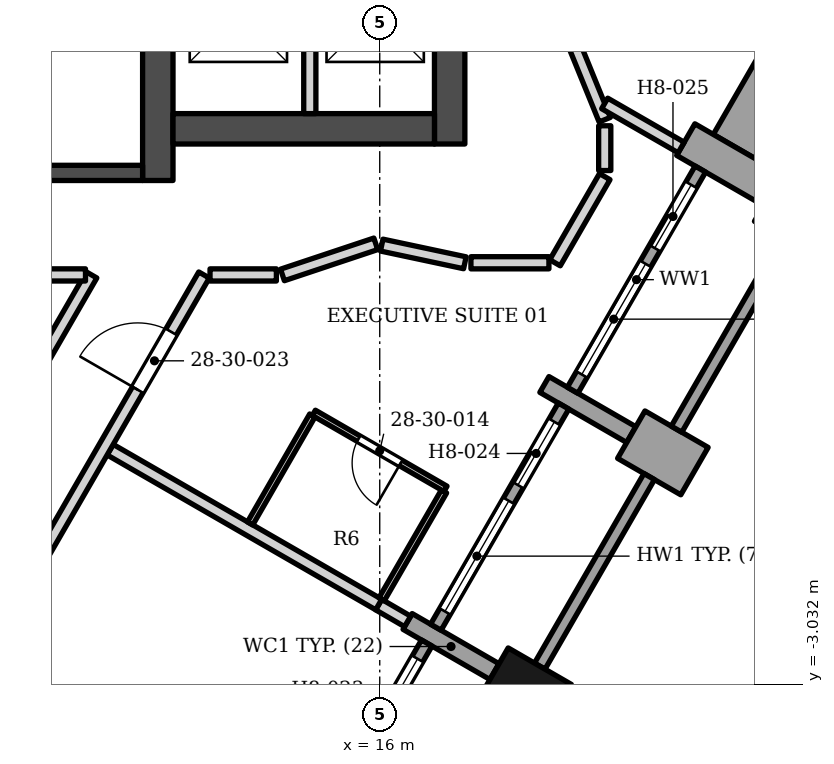
"""IFC4 building model, lengths in metres.
Left out: names, types, materials, properties, quantities, classifications, styles, units other than length and angle.
Written with IfcOpenShell. Run it as: python <this file> out.ifc"""

import sys

from ifc_helpers import new_model, si_unit, direction, frame, frame_2d, origin, origin_2d, place, context, subcontext, project, spatial, polyline, rectangle, outline, extrude, element, fill, save


model = new_model("IFC4")
c1 = context("Model", 3, precision=1e-05, world=origin(), true_north=direction((0.0, 1.0)))
c2 = subcontext(c1, "Body", "Model", "MODEL_VIEW")
j1 = project(units=[si_unit("LENGTHUNIT", "METRE"), si_unit("PLANEANGLEUNIT", "RADIAN")], contexts=[c1])
p1 = place(None, origin())
s1 = spatial("IfcSite", under=j1, at=p1, CompositionType="ELEMENT")
p2 = place(p1, origin())
s2 = spatial("IfcBuilding", under=s1, at=p2, CompositionType="ELEMENT")
p3 = place(p2, frame((0.0, 0.0, 122.4)))
s3 = spatial("IfcBuildingStorey", under=s2, at=p3, CompositionType="ELEMENT", Elevation=122.4)
p4 = place(p3, frame((12.35, 5.253, 0.0), z_axis=(0.0, 0.0, 1.0), x_axis=(0.0, 1.0, 0.0)))
e1 = element("IfcWall", 1, at=p4, inside=s3, PredefinedType="SHEAR", context=c2, shape_type="SweptSolid", body=[
    extrude(rectangle(XDim=13.3, YDim=0.5, at=frame_2d((6.65, 0.0))), origin(), (0.0, 0.0, 1.0), 3.4),
])
p5 = place(p3, frame((8.35, 5.378, 0.0), z_axis=(0.0, 0.0, 1.0), x_axis=(1.0, 0.0, 0.0)))
e2 = element("IfcWall", 2, at=p5, inside=s3, PredefinedType="SHEAR", context=c2, shape_type="SweptSolid", body=[
    extrude(rectangle(XDim=3.75, YDim=0.25, at=frame_2d((1.875, 0.0))), origin(), (0.0, 0.0, 1.0), 3.4),
])
p6 = place(p3, frame((12.6, 6.103, 0.0), z_axis=(0.0, 0.0, 1.0), x_axis=(1.0, 0.0, 0.0)))
e3 = element("IfcWall", 3, at=p6, inside=s3, PredefinedType="SHEAR", context=c2, shape_type="SweptSolid", body=[
    extrude(rectangle(XDim=4.3, YDim=0.5, at=frame_2d((2.15, 0.0))), origin(), (0.0, 0.0, 1.0), 3.4),
])
p7 = place(p3, frame((17.15, 5.853, 0.0), z_axis=(0.0, 0.0, 1.0), x_axis=(0.0, 1.0, 0.0)))
e4 = element("IfcWall", 4, at=p7, inside=s3, PredefinedType="SHEAR", context=c2, shape_type="SweptSolid", body=[
    extrude(rectangle(XDim=13.2, YDim=0.5, at=frame_2d((6.6, 0.0))), origin(), (0.0, 0.0, 1.0), 3.4),
])
p8 = place(p7, frame((4.1, 0.0, 0.0)))
e5 = element("IfcOpeningElement", 5, at=p8, cuts=e4, PredefinedType="OPENING", context=c2, shape_type="SweptSolid", body=[
    extrude(rectangle(XDim=1.6, YDim=2.1, at=frame_2d((0.8, 1.05))), frame((0.0, 0.26, 0.0), z_axis=(0.0, -1.0, 0.0), x_axis=(1.0, 0.0, 0.0)), (0.0, 0.0, 1.0), 0.52),
])
p9 = place(p7, frame((10.15, 0.0, 0.0)))
e6 = element("IfcOpeningElement", 6, at=p9, cuts=e4, PredefinedType="OPENING", context=c2, shape_type="SweptSolid", body=[
    extrude(rectangle(XDim=0.9, YDim=2.1, at=frame_2d((0.45, 1.05))), frame((0.0, 0.26, 0.0), z_axis=(0.0, -1.0, 0.0), x_axis=(1.0, 0.0, 0.0)), (0.0, 0.0, 1.0), 0.52),
])
for number, where, z_axis, x_axis in (
    (7, (18.407, -3.124, 0.0), (0.0, 0.0, 1.0), (0.5, 0.866, 0.0)),
    (8, (22.907, 4.671, 0.0), (0.0, 0.0, 1.0), (0.5, 0.866, 0.0)),
):
    element("IfcColumn", number, at=place(p3, frame(where, z_axis=z_axis, x_axis=x_axis)), inside=s3, PredefinedType="COLUMN", context=c2, shape_type="SweptSolid", body=[
        extrude(rectangle(XDim=0.9, YDim=1.2, at=origin_2d()), origin(), (0.0, 0.0, 1.0), 3.4),
    ])
p10 = place(p3, frame((16.458, -1.999, 0.0), z_axis=(0.0, 0.0, 1.0), x_axis=(0.866040211805, -0.499974350878, 0.0)))
e9 = element("IfcWall", 9, at=p10, inside=s3, PredefinedType="SOLIDWALL", context=c2, shape_type="SweptSolid", body=[
    extrude(rectangle(XDim=1.65, YDim=0.3, at=frame_2d((0.825, 0.0))), origin(), (0.0, 0.0, 1.0), 2.65),
])
p11 = place(p3, frame((21.176, 0.473, 0.0), z_axis=(0.0, 0.0, 1.0), x_axis=(-0.866006032174, 0.500033551112, 0.0)))
e10 = element("IfcWall", 10, at=p11, inside=s3, PredefinedType="SOLIDWALL", context=c2, shape_type="SweptSolid", body=[
    extrude(rectangle(XDim=1.2, YDim=0.9, at=frame_2d((0.6, 0.0))), origin(), (0.0, 0.0, 1.0), 2.63),
])
p12 = place(p3, frame((18.708, 1.898, 0.0), z_axis=(0.0, 0.0, 1.0), x_axis=(0.866040211805, -0.499974350878, 0.0)))
e11 = element("IfcWall", 11, at=p12, inside=s3, PredefinedType="SOLIDWALL", context=c2, shape_type="SweptSolid", body=[
    extrude(rectangle(XDim=1.65, YDim=0.3, at=frame_2d((0.825, 0.0))), origin(), (0.0, 0.0, 1.0), 2.65),
])
p13 = place(p3, frame((21.033, 5.925, 0.0), z_axis=(0.0, 0.0, 1.0), x_axis=(0.866040211805, -0.499974350878, 0.0)))
e12 = element("IfcWall", 12, at=p13, inside=s3, PredefinedType="SOLIDWALL", context=c2, shape_type="SweptSolid", body=[
    extrude(rectangle(XDim=1.65, YDim=0.6, at=frame_2d((0.825, 0.0))), origin(), (0.0, 0.0, 1.0), 2.384),
])
p14 = place(p3, frame((14.673, -5.991, 0.0), z_axis=(0.0, 0.0, 1.0), x_axis=(0.499958946799, 0.866049104564, 0.0)))
e13 = element("IfcWall", 13, at=p14, inside=s3, PredefinedType="ELEMENTEDWALL", context=c2, shape_type="SweptSolid", body=[
    extrude(rectangle(XDim=4.2, YDim=0.2, at=frame_2d((2.1, 0.0))), origin(), (0.0, 0.0, 1.0), 2.474),
])
p15 = place(p14, frame((0.3, 0.0, 0.6)))
e14 = element("IfcOpeningElement", 14, at=p15, cuts=e13, PredefinedType="OPENING", context=c2, shape_type="SweptSolid", body=[
    extrude(rectangle(XDim=2.1, YDim=1.77, at=frame_2d((1.05, 0.885))), frame((0.0, 0.11, 0.0), z_axis=(0.0, -1.0, 0.0), x_axis=(1.0, 0.0, 0.0)), (0.0, 0.0, 1.0), 0.22),
])
p16 = place(p14, frame((2.7, 0.0, 0.0)))
e15 = element("IfcOpeningElement", 15, at=p16, cuts=e13, PredefinedType="OPENING", context=c2, shape_type="SweptSolid", body=[
    extrude(rectangle(XDim=1.2, YDim=2.37, at=frame_2d((0.6, 1.185))), frame((0.0, 0.11, 0.0), z_axis=(0.0, -1.0, 0.0), x_axis=(1.0, 0.0, 0.0)), (0.0, 0.0, 1.0), 0.22),
])
p17 = place(p3, frame((18.632, -2.734, 0.0), z_axis=(0.0, 0.0, 1.0), x_axis=(0.499982693035, 0.866035395735, 0.0)))
e16 = element("IfcWall", 16, at=p17, inside=s3, PredefinedType="SOLIDWALL", context=c2, shape_type="SweptSolid", body=[
    extrude(rectangle(XDim=3.6, YDim=0.2, at=frame_2d((1.8, 0.0))), origin(), (0.0, 0.0, 1.0), 2.63),
])
p18 = place(p3, frame((16.923, -2.094, 0.0), z_axis=(0.0, 0.0, 1.0), x_axis=(0.49998411664, 0.866034573852, 0.0)))
e17 = element("IfcWall", 17, at=p18, inside=s3, PredefinedType="ELEMENTEDWALL", context=c2, shape_type="SweptSolid", body=[
    extrude(rectangle(XDim=4.2, YDim=0.2, at=frame_2d((2.1, 0.0))), origin(), (0.0, 0.0, 1.0), 2.65),
])
p19 = place(p18, frame((0.3, 0.0, 0.6)))
e18 = element("IfcOpeningElement", 18, at=p19, cuts=e17, PredefinedType="OPENING", context=c2, shape_type="SweptSolid", body=[
    extrude(rectangle(XDim=2.1, YDim=1.8, at=frame_2d((1.05, 0.9))), frame((0.0, 0.11, 0.0), z_axis=(0.0, -1.0, 0.0), x_axis=(1.0, 0.0, 0.0)), (0.0, 0.0, 1.0), 0.22),
])
p20 = place(p18, frame((2.7, 0.0, 0.0)))
e19 = element("IfcOpeningElement", 19, at=p20, cuts=e17, PredefinedType="OPENING", context=c2, shape_type="SweptSolid", body=[
    extrude(rectangle(XDim=1.2, YDim=2.4, at=frame_2d((0.6, 1.2))), frame((0.0, 0.11, 0.0), z_axis=(0.0, -1.0, 0.0), x_axis=(1.0, 0.0, 0.0)), (0.0, 0.0, 1.0), 0.22),
])
p21 = place(p3, frame((20.882, 1.163, 0.0), z_axis=(0.0, 0.0, 1.0), x_axis=(0.500012057535, 0.866018442252, 0.0)))
e20 = element("IfcWall", 20, at=p21, inside=s3, PredefinedType="SOLIDWALL", context=c2, shape_type="SweptSolid", body=[
    extrude(rectangle(XDim=3.6, YDim=0.2, at=frame_2d((1.8, 0.0))), origin(), (0.0, 0.0, 1.0), 2.63),
])
p22 = place(p3, frame((19.173, 1.803, 0.0), z_axis=(0.0, 0.0, 1.0), x_axis=(0.499958946799, 0.866049104564, 0.0)))
e21 = element("IfcWall", 21, at=p22, inside=s3, PredefinedType="ELEMENTEDWALL", context=c2, shape_type="SweptSolid", body=[
    extrude(rectangle(XDim=4.2, YDim=0.2, at=frame_2d((2.1, 0.0))), origin(), (0.0, 0.0, 1.0), 2.45),
])
p23 = place(p22, frame((0.3, 0.0, 0.6)))
e22 = element("IfcOpeningElement", 22, at=p23, cuts=e21, PredefinedType="OPENING", context=c2, shape_type="SweptSolid", body=[
    extrude(rectangle(XDim=2.1, YDim=1.75, at=frame_2d((1.05, 0.875))), frame((0.0, 0.11, 0.0), z_axis=(0.0, -1.0, 0.0), x_axis=(1.0, 0.0, 0.0)), (0.0, 0.0, 1.0), 0.22),
])
p24 = place(p22, frame((2.7, 0.0, 0.0)))
e23 = element("IfcOpeningElement", 23, at=p24, cuts=e21, PredefinedType="OPENING", context=c2, shape_type="SweptSolid", body=[
    extrude(rectangle(XDim=1.2, YDim=2.35, at=frame_2d((0.6, 1.175))), frame((0.0, 0.11, 0.0), z_axis=(0.0, -1.0, 0.0), x_axis=(1.0, 0.0, 0.0)), (0.0, 0.0, 1.0), 0.22),
])
p25 = place(p3, origin())
e24 = element("IfcWall", 24, at=p25, inside=s3, PredefinedType="SOLIDWALL", context=c2, shape_type="SweptSolid", body=[
    extrude(outline(polyline([(22.565, 7.878), (21.486, 6.01), (22.612, 5.36), (22.612, 5.361), (23.652, 4.761), (24.73, 6.628), (22.565, 7.878)])), origin(), (0.0, 0.0, 1.0), 2.384),
])
p26 = place(p3, frame((14.85, 6.353, 0.0), z_axis=(0.0, 0.0, 1.0), x_axis=(0.0, 1.0, 0.0)))
e25 = element("IfcWall", 25, at=p26, inside=s3, PredefinedType="SOLIDWALL", context=c2, shape_type="SweptSolid", body=[
    extrude(rectangle(XDim=2.5, YDim=0.2, at=frame_2d((1.25, 0.0))), origin(), (0.0, 0.0, 1.0), 3.23),
])
p27 = place(p3, frame((5.829, -5.705, 0.0), z_axis=(0.0, 0.0, 1.0), x_axis=(0.500142759665, 0.865942965763, 0.0)))
e26 = element("IfcWall", 26, at=p27, inside=s3, PredefinedType="PARTITIONING", context=c2, shape_type="SweptSolid", body=[
    extrude(rectangle(XDim=10.86, YDim=0.2, at=frame_2d((5.43, 0.0))), origin(), (0.0, 0.0, 1.0), 2.242),
])
p28 = place(p27, frame((6.768, 0.0, 0.0)))
e27 = element("IfcOpeningElement", 27, at=p28, cuts=e26, PredefinedType="OPENING", context=c2, shape_type="SweptSolid", body=[
    extrude(rectangle(XDim=1.0, YDim=2.1, at=frame_2d((0.5, 1.05))), frame((0.0, 0.11, 0.0), z_axis=(0.0, -1.0, 0.0), x_axis=(1.0, 0.0, 0.0)), (0.0, 0.0, 1.0), 0.22),
])
p29 = place(p27, frame((3.563, 0.0, 0.0)))
e28 = element("IfcOpeningElement", 28, at=p29, cuts=e26, PredefinedType="OPENING", context=c2, shape_type="SweptSolid", body=[
    extrude(rectangle(XDim=1.0, YDim=2.1, at=frame_2d((0.5, 1.05))), frame((0.0, 0.11, 0.0), z_axis=(0.0, -1.0, 0.0), x_axis=(1.0, 0.0, 0.0)), (0.0, 0.0, 1.0), 0.22),
])
p30 = place(p3, frame((15.983, -1.722, 0.0), z_axis=(0.0, 0.0, 1.0), x_axis=(0.864695615284, -0.502296220281, 0.0)))
e29 = element("IfcWall", 29, at=p30, inside=s3, PredefinedType="PARTITIONING", context=c2, shape_type="SweptSolid", body=[
    extrude(rectangle(XDim=0.55, YDim=0.2, at=frame_2d((0.275, 0.0))), origin(), (0.0, 0.0, 1.0), 3.23),
])
p31 = place(p3, frame((11.566, 0.826, 0.0), z_axis=(0.0, 0.0, 1.0), x_axis=(0.866318662666, -0.499491716364, 0.0)))
e30 = element("IfcWall", 30, at=p31, inside=s3, PredefinedType="PARTITIONING", context=c2, shape_type="SweptSolid", body=[
    extrude(rectangle(XDim=5.099, YDim=0.2, at=frame_2d((2.55, 0.0))), origin(), (0.0, 0.0, 1.0), 2.308),
])
p32 = place(p3, frame((16.031, -1.636, 0.0), z_axis=(0.0, 0.0, 1.0), x_axis=(0.500646589026, 0.865651773461, 0.0)))
e31 = element("IfcWall", 31, at=p32, inside=s3, PredefinedType="PARTITIONING", context=c2, shape_type="SweptSolid", body=[
    extrude(rectangle(XDim=2.05, YDim=0.1, at=frame_2d((1.025, 0.0))), origin(), (0.0, 0.0, 1.0), 3.23),
])
p33 = place(p3, frame((14.917, 1.432, 0.0), z_axis=(0.0, 0.0, 1.0), x_axis=(0.866022959057, -0.500004234368, 0.0)))
e32 = element("IfcWall", 32, at=p33, inside=s3, PredefinedType="PARTITIONING", context=c2, shape_type="SweptSolid", body=[
    extrude(rectangle(XDim=2.5, YDim=0.1, at=frame_2d((1.25, 0.0))), origin(), (0.0, 0.0, 1.0), 2.474),
])
p34 = place(p33, frame((0.85, 0.0, 0.0)))
e33 = element("IfcOpeningElement", 33, at=p34, cuts=e32, PredefinedType="OPENING", context=c2, shape_type="SweptSolid", body=[
    extrude(rectangle(XDim=0.8, YDim=2.1, at=frame_2d((0.4, 1.05))), frame((0.0, 0.06, 0.0), z_axis=(0.0, -1.0, 0.0), x_axis=(1.0, 0.0, 0.0)), (0.0, 0.0, 1.0), 0.12),
])
p35 = place(p3, frame((13.868, -0.387, 0.0), z_axis=(0.0, 0.0, 1.0), x_axis=(0.499265284884, 0.866449176415, 0.0)))
e34 = element("IfcWall", 34, at=p35, inside=s3, PredefinedType="PARTITIONING", context=c2, shape_type="SweptSolid", body=[
    extrude(rectangle(XDim=2.05, YDim=0.1, at=frame_2d((1.025, 0.0))), origin(), (0.0, 0.0, 1.0), 3.23),
])
p36 = place(p3, frame((6.0, 3.7, 0.0), z_axis=(0.0, 0.0, 1.0), x_axis=(1.0, 0.0, 0.0)))
e35 = element("IfcWall", 35, at=p36, inside=s3, PredefinedType="PARTITIONING", context=c2, shape_type="SweptSolid", body=[
    extrude(rectangle(XDim=5.161, YDim=0.2, at=frame_2d((2.581, 0.0))), origin(), (0.0, 0.0, 1.0), 2.242),
])
p37 = place(p3, frame((0.23, -18.61, 0.0), z_axis=(0.0, 0.0, 1.0), x_axis=(0.499999197515, 0.866025867099, 0.0)))
e36 = element("IfcWall", 36, at=p37, inside=s3, PredefinedType="PARTITIONING", context=c2, shape_type="SweptSolid", body=[
    extrude(rectangle(XDim=25.76, YDim=0.2, at=frame_2d((12.88, 0.0))), origin(), (0.0, 0.0, 1.0), 2.242),
])
p38 = place(p37, frame((0.8, 0.0, 0.0)))
e37 = element("IfcOpeningElement", 37, at=p38, cuts=e36, PredefinedType="OPENING", context=c2, shape_type="SweptSolid", body=[
    extrude(rectangle(XDim=1.1, YDim=2.1, at=frame_2d((0.55, 1.05))), frame((0.0, 0.11, 0.0), z_axis=(0.0, -1.0, 0.0), x_axis=(1.0, 0.0, 0.0)), (0.0, 0.0, 1.0), 0.22),
])
p39 = place(p37, frame((14.95, 0.0, 0.0)))
e38 = element("IfcOpeningElement", 38, at=p39, cuts=e36, PredefinedType="OPENING", context=c2, shape_type="SweptSolid", body=[
    extrude(rectangle(XDim=1.6, YDim=2.1, at=frame_2d((0.8, 1.05))), frame((0.0, 0.11, 0.0), z_axis=(0.0, -1.0, 0.0), x_axis=(1.0, 0.0, 0.0)), (0.0, 0.0, 1.0), 0.22),
])
p40 = place(p37, frame((23.58, 0.0, 0.0)))
e39 = element("IfcOpeningElement", 39, at=p40, cuts=e36, PredefinedType="OPENING", context=c2, shape_type="SweptSolid", body=[
    extrude(rectangle(XDim=1.1, YDim=2.1, at=frame_2d((0.55, 1.05))), frame((0.0, 0.11, 0.0), z_axis=(0.0, -1.0, 0.0), x_axis=(1.0, 0.0, 0.0)), (0.0, 0.0, 1.0), 0.22),
])
p41 = place(p3, frame((13.209, 3.699, 0.0), z_axis=(0.0, 0.0, 1.0), x_axis=(1.0, 0.0, 0.0)))
e40 = element("IfcWall", 40, at=p41, inside=s3, PredefinedType="PARTITIONING", context=c2, shape_type="SweptSolid", body=[
    extrude(rectangle(XDim=1.091, YDim=0.2, at=frame_2d((0.545, 0.0))), origin(), (0.0, 0.0, 1.0), 2.308),
])
p42 = place(p3, frame((14.4, 3.699, 0.0), z_axis=(0.0, 0.0, 1.0), x_axis=(0.948653110684, 0.316318313712, 0.0)))
e41 = element("IfcWall", 41, at=p42, inside=s3, PredefinedType="PARTITIONING", context=c2, shape_type="SweptSolid", body=[
    extrude(rectangle(XDim=1.618, YDim=0.2, at=frame_2d((0.809, 0.0))), origin(), (0.0, 0.0, 1.0), 2.474),
])
p43 = place(p3, frame((17.5, 3.899, 0.0), z_axis=(0.0, 0.0, 1.0), x_axis=(0.99999998188, 0.000190367406, 0.0)))
e42 = element("IfcWall", 42, at=p43, inside=s3, PredefinedType="PARTITIONING", context=c2, shape_type="SweptSolid", body=[
    extrude(rectangle(XDim=1.282, YDim=0.2, at=frame_2d((0.641, 0.0))), origin(), (0.0, 0.0, 1.0), 3.23),
])
p44 = place(p3, frame((18.882, 3.9, 0.0), z_axis=(0.0, 0.0, 1.0), x_axis=(0.500071224646, 0.865984278311, 0.0)))
e43 = element("IfcWall", 43, at=p44, inside=s3, PredefinedType="PARTITIONING", context=c2, shape_type="SweptSolid", body=[
    extrude(rectangle(XDim=1.636, YDim=0.2, at=frame_2d((0.818, 0.0))), origin(), (0.0, 0.0, 1.0), 2.45),
])
p45 = place(p3, frame((16.033, 4.19, 0.0), z_axis=(0.0, 0.0, 1.0), x_axis=(0.978123323974, -0.208025871224, 0.0)))
e44 = element("IfcWall", 44, at=p45, inside=s3, PredefinedType="PARTITIONING", context=c2, shape_type="SweptSolid", body=[
    extrude(rectangle(XDim=1.398, YDim=0.2, at=frame_2d((0.699, 0.0))), origin(), (0.0, 0.0, 1.0), 3.23),
])
p46 = place(p3, frame((19.7, 5.417, 0.0), z_axis=(0.0, 0.0, 1.0), x_axis=(0.0, 1.0, 0.0)))
e45 = element("IfcWall", 45, at=p46, inside=s3, PredefinedType="PARTITIONING", context=c2, shape_type="SweptSolid", body=[
    extrude(rectangle(XDim=0.736, YDim=0.2, at=frame_2d((0.368, 0.0))), origin(), (0.0, 0.0, 1.0), 3.23),
])
p47 = place(p3, frame((19.007, 7.955, 0.0), z_axis=(0.0, 0.0, 1.0), x_axis=(0.377039539336, -0.926197163555, 0.0)))
e46 = element("IfcWall", 46, at=p47, inside=s3, PredefinedType="PARTITIONING", context=c2, shape_type="SweptSolid", body=[
    extrude(rectangle(XDim=1.838, YDim=0.2, at=frame_2d((0.919, 0.0))), origin(), (0.0, 0.0, 1.0), 3.23),
])
p48 = place(p3, frame((19.7, 6.52, 0.0), z_axis=(0.0, 0.0, 1.0), x_axis=(0.866582796781, -0.499033321856, 0.0)))
e47 = element("IfcWall", 47, at=p48, inside=s3, PredefinedType="PARTITIONING", context=c2, shape_type="SweptSolid", body=[
    extrude(rectangle(XDim=1.452, YDim=0.2, at=frame_2d((0.726, 0.0))), origin(), (0.0, 0.0, 1.0), 2.384),
])
p49 = place(p16, origin())
e48 = element("IfcDoor", 48, at=p49, inside=s3, OperationType="SINGLE_SWING_LEFT", PredefinedType="DOOR", context=c2, shape_type="SweptSolid", body=[
    extrude(rectangle(XDim=1.2, YDim=2.37, at=frame_2d((0.6, 1.185))), frame((0.0, 0.025, 0.0), z_axis=(0.0, -1.0, 0.0), x_axis=(1.0, 0.0, 0.0)), (0.0, 0.0, 1.0), 0.05),
])
fill(e15, e48)
p50 = place(p19, origin())
e49 = element("IfcWindow", 49, at=p50, inside=s3, PartitioningType="SINGLE_PANEL", PredefinedType="WINDOW", context=c2, shape_type="SweptSolid", body=[
    extrude(rectangle(XDim=2.1, YDim=1.8, at=frame_2d((1.05, 0.9))), frame((0.0, 0.03, 0.0), z_axis=(0.0, -1.0, 0.0), x_axis=(1.0, 0.0, 0.0)), (0.0, 0.0, 1.0), 0.06),
])
fill(e18, e49)
p51 = place(p20, origin())
e50 = element("IfcDoor", 50, at=p51, inside=s3, OperationType="SINGLE_SWING_LEFT", PredefinedType="DOOR", context=c2, shape_type="SweptSolid", body=[
    extrude(rectangle(XDim=1.2, YDim=2.4, at=frame_2d((0.6, 1.2))), frame((0.0, 0.025, 0.0), z_axis=(0.0, -1.0, 0.0), x_axis=(1.0, 0.0, 0.0)), (0.0, 0.0, 1.0), 0.05),
])
fill(e19, e50)
p52 = place(p23, origin())
e51 = element("IfcWindow", 51, at=p52, inside=s3, PartitioningType="SINGLE_PANEL", PredefinedType="WINDOW", context=c2, shape_type="SweptSolid", body=[
    extrude(rectangle(XDim=2.1, YDim=1.75, at=frame_2d((1.05, 0.875))), frame((0.0, 0.03, 0.0), z_axis=(0.0, -1.0, 0.0), x_axis=(1.0, 0.0, 0.0)), (0.0, 0.0, 1.0), 0.06),
])
fill(e22, e51)
p53 = place(p24, origin())
e52 = element("IfcDoor", 52, at=p53, inside=s3, OperationType="SINGLE_SWING_LEFT", PredefinedType="DOOR", context=c2, shape_type="SweptSolid", body=[
    extrude(rectangle(XDim=1.2, YDim=2.35, at=frame_2d((0.6, 1.175))), frame((0.0, 0.025, 0.0), z_axis=(0.0, -1.0, 0.0), x_axis=(1.0, 0.0, 0.0)), (0.0, 0.0, 1.0), 0.05),
])
fill(e23, e52)
p54 = place(p34, origin())
e53 = element("IfcDoor", 53, at=p54, inside=s3, OperationType="SINGLE_SWING_RIGHT", PredefinedType="DOOR", context=c2, shape_type="SweptSolid", body=[
    extrude(rectangle(XDim=0.8, YDim=2.1, at=frame_2d((0.4, 1.05))), frame((0.0, 0.025, 0.0), z_axis=(0.0, -1.0, 0.0), x_axis=(1.0, 0.0, 0.0)), (0.0, 0.0, 1.0), 0.05),
])
fill(e33, e53)
p55 = place(p40, origin())
e54 = element("IfcDoor", 54, at=p55, inside=s3, OperationType="SINGLE_SWING_LEFT", PredefinedType="DOOR", context=c2, shape_type="SweptSolid", body=[
    extrude(rectangle(XDim=1.1, YDim=2.1, at=frame_2d((0.55, 1.05))), frame((0.0, 0.025, 0.0), z_axis=(0.0, -1.0, 0.0), x_axis=(1.0, 0.0, 0.0)), (0.0, 0.0, 1.0), 0.05),
])
fill(e39, e54)
save(model, sys.argv[1])
